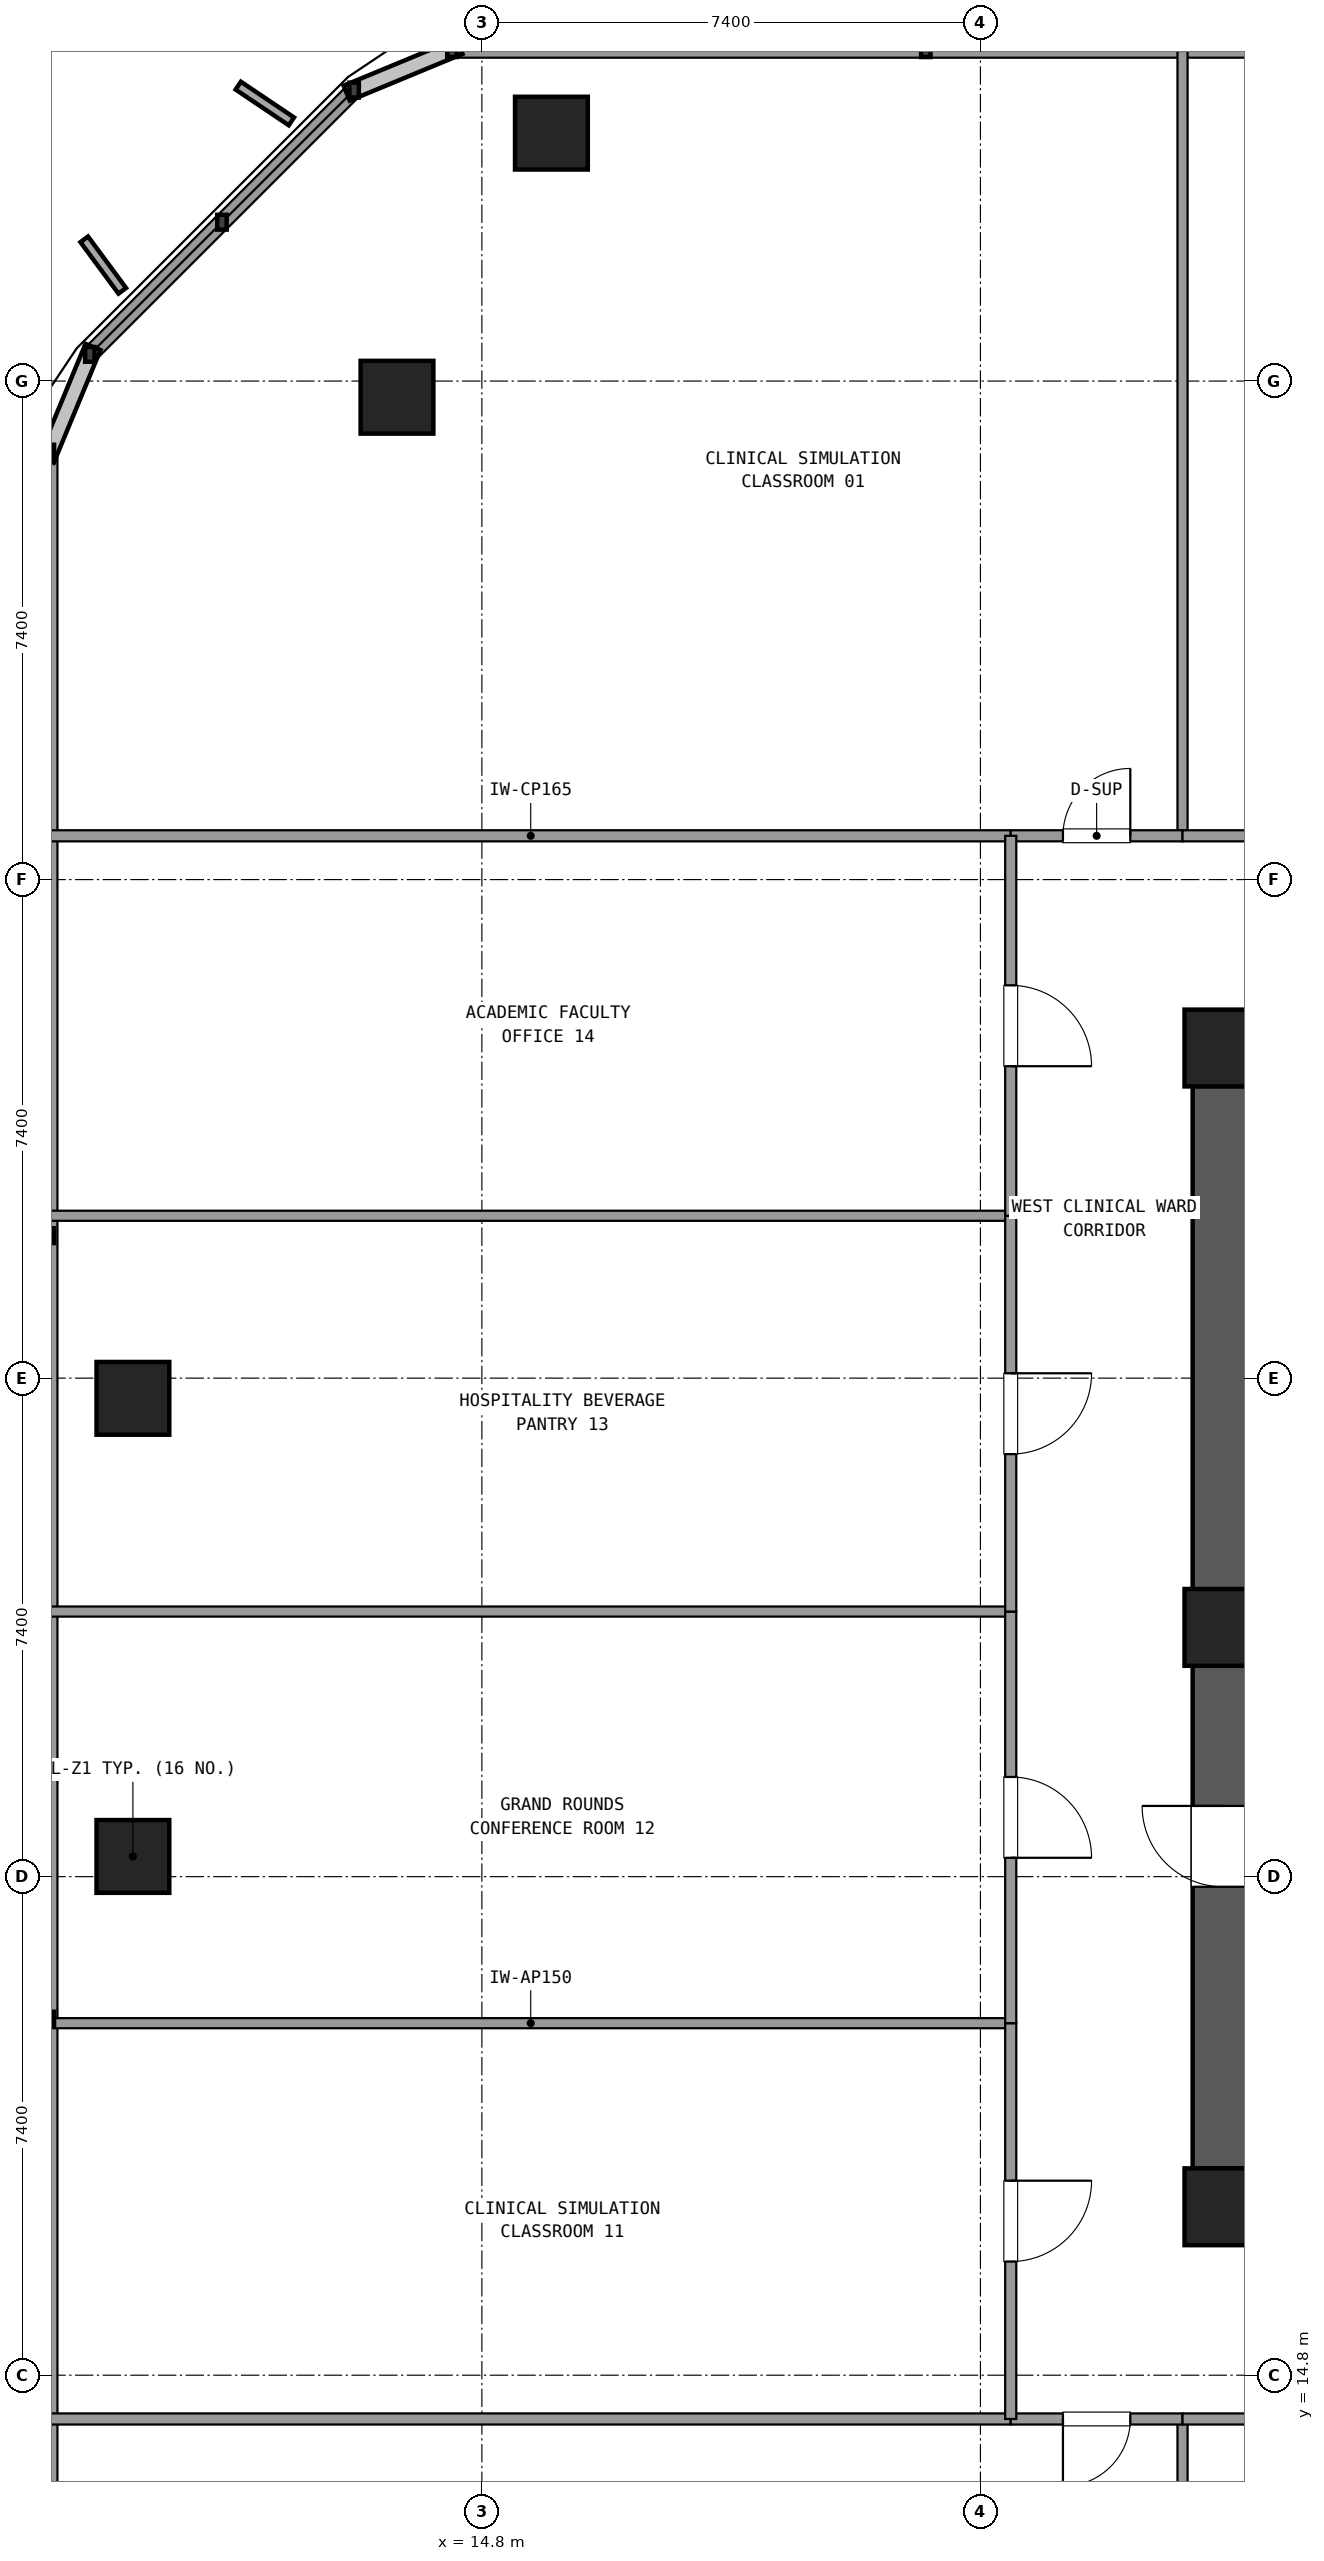
"""IFC4 building model, lengths in metres.
Left out: names, types, materials, properties, quantities, classifications, styles, units other than length and angle.
Written with IfcOpenShell. Run it as: python <this file> out.ifc"""

import sys

from ifc_helpers import new_model, si_unit, direction, frame, frame_2d, origin, origin_2d, place, context, subcontext, project, spatial, rectangle, extrude, element, fill, save


model = new_model("IFC4")
c1 = context("Model", 3, precision=1e-05, world=origin(), true_north=direction((0.0, 1.0)))
c2 = subcontext(c1, "Body", "Model", "MODEL_VIEW")
j1 = project(units=[si_unit("LENGTHUNIT", "METRE"), si_unit("PLANEANGLEUNIT", "RADIAN")], contexts=[c1])
p1 = place(None, origin())
s1 = spatial("IfcSite", under=j1, at=p1, CompositionType="ELEMENT")
p2 = place(p1, origin())
s2 = spatial("IfcBuilding", under=s1, at=p2, CompositionType="ELEMENT")
p3 = place(p2, frame((0.0, 0.0, 52.74)))
s3 = spatial("IfcBuildingStorey", under=s2, at=p3, CompositionType="ELEMENT", Elevation=52.74)
for number, where, z_axis, x_axis in (
    (1, (25.8, 17.3, 0.0), (0.0, 0.0, 1.0), (1.0, 0.0, 0.0)),
    (2, (25.8, 34.5, 0.0), (0.0, 0.0, 1.0), (1.0, 0.0, 0.0)),
    (3, (25.8, 25.9, 0.0), (0.0, 0.0, 1.0), (1.0, 0.0, 0.0)),
):
    element("IfcColumn", number, at=place(p3, frame(where, z_axis=z_axis, x_axis=x_axis)), inside=s3, PredefinedType="COLUMN", context=c2, shape_type="SweptSolid", body=[
        extrude(rectangle(XDim=1.14, YDim=1.14, at=origin_2d()), origin(), (0.0, 0.0, 1.0), 3.6),
    ])
p4 = place(p3, frame((25.8, 33.935, 0.0), z_axis=(0.0, 0.0, 1.0), x_axis=(0.0, -1.0, 0.0)))
e4 = element("IfcWall", 4, at=p4, inside=s3, PredefinedType="SHEAR", context=c2, shape_type="SweptSolid", body=[
    extrude(rectangle(XDim=7.47, YDim=0.9, at=frame_2d((3.735, 0.0))), origin(), (0.0, 0.0, 1.0), 3.32),
])
p5 = place(p3, frame((25.8, 25.335, 0.0), z_axis=(0.0, 0.0, 1.0), x_axis=(0.0, -1.0, 0.0)))
e5 = element("IfcWall", 5, at=p5, inside=s3, PredefinedType="SHEAR", context=c2, shape_type="SweptSolid", body=[
    extrude(rectangle(XDim=7.47, YDim=0.9, at=frame_2d((3.735, 0.0))), origin(), (0.0, 0.0, 1.0), 3.32),
])
p6 = place(p5, frame((2.085, 0.0, 0.0)))
e6 = element("IfcOpeningElement", 6, at=p6, cuts=e5, PredefinedType="OPENING", context=c2, shape_type="SweptSolid", body=[
    extrude(rectangle(XDim=1.2, YDim=2.15, at=frame_2d((0.6, 1.075))), frame((0.0, 0.46, 0.0), z_axis=(0.0, -1.0, 0.0), x_axis=(1.0, 0.0, 0.0)), (0.0, 0.0, 1.0), 0.92),
])
for number, where, z_axis, x_axis in (
    (7, (9.62, 22.5, 0.0), (0.0, 0.0, 1.0), (1.0, 0.0, 0.0)),
    (8, (15.832, 48.08, 0.0), (0.0, 0.0, 1.0), (1.0, 0.0, 0.0)),
    (9, (13.54, 44.16, 0.0), (0.0, 0.0, 1.0), (1.0, 0.0, 0.0)),
    (10, (9.62, 29.3, 0.0), (0.0, 0.0, 1.0), (1.0, 0.0, 0.0)),
):
    element("IfcColumn", number, at=place(p3, frame(where, z_axis=z_axis, x_axis=x_axis)), inside=s3, PredefinedType="COLUMN", context=c2, shape_type="SweptSolid", body=[
        extrude(rectangle(XDim=1.08, YDim=1.08, at=origin_2d()), origin(), (0.0, 0.0, 1.0), 3.6),
    ])
p7 = place(p3, frame((35.46, 49.32, 0.0), z_axis=(0.0, 0.0, 1.0), x_axis=(-1.0, 0.0, 0.0)))
e11 = element("IfcWall", 11, at=p7, inside=s3, PredefinedType="SOLIDWALL", context=c2, shape_type="SweptSolid", body=[
    extrude(rectangle(XDim=21.105, YDim=0.24, at=frame_2d((10.552, 0.0))), origin(), (0.0, 0.0, 1.0), 0.85),
])
p8 = place(p3, frame((12.904, 48.719, 0.0), z_axis=(0.0, 0.0, 1.0), x_axis=(-0.707106781187, -0.707106781187, 0.0)))
e12 = element("IfcWall", 12, at=p8, inside=s3, PredefinedType="SOLIDWALL", context=c2, shape_type="SweptSolid", body=[
    extrude(rectangle(XDim=5.548, YDim=0.24, at=frame_2d((2.774, 0.0))), origin(), (0.0, 0.0, 1.0), 0.85),
])
p9 = place(p3, frame((8.38, 43.345, 0.0), z_axis=(0.0, 0.0, 1.0), x_axis=(0.0, -1.0, 0.0)))
e13 = element("IfcWall", 13, at=p9, inside=s3, PredefinedType="SOLIDWALL", context=c2, shape_type="SweptSolid", body=[
    extrude(rectangle(XDim=34.89, YDim=0.24, at=frame_2d((17.445, 0.0))), origin(), (0.0, 0.0, 1.0), 0.85),
])
for number, where, z_axis, x_axis in (
    (14, (8.4, 37.65, 0.0), (0.0, 0.0, 1.0), (1.0, 0.0, 0.0)),
    (15, (8.4, 14.15, 0.0), (0.0, 0.0, 1.0), (1.0, 0.0, 0.0)),
):
    element("IfcWall", number, at=place(p3, frame(where, z_axis=z_axis, x_axis=x_axis)), inside=s3, PredefinedType="PARTITIONING", context=c2, shape_type="SweptSolid", body=[
        extrude(rectangle(XDim=14.25, YDim=0.165, at=frame_2d((7.125, 0.0))), origin(), (0.0, 0.0, 1.0), 2.61),
    ])
p10 = place(p3, frame((25.2, 37.65, 0.0), z_axis=(0.0, 0.0, 1.0), x_axis=(0.0, 1.0, 0.0)))
e16 = element("IfcWall", 16, at=p10, inside=s3, PredefinedType="PARTITIONING", context=c2, shape_type="SweptSolid", body=[
    extrude(rectangle(XDim=11.65, YDim=0.15, at=frame_2d((5.825, 0.0))), origin(), (0.0, 0.0, 1.0), 2.61),
])
p11 = place(p3, frame((22.65, 37.65, 0.0), z_axis=(0.0, 0.0, 1.0), x_axis=(1.0, 0.0, 0.0)))
e17 = element("IfcWall", 17, at=p11, inside=s3, PredefinedType="PARTITIONING", context=c2, shape_type="SweptSolid", body=[
    extrude(rectangle(XDim=2.55, YDim=0.165, at=frame_2d((1.275, 0.0))), origin(), (0.0, 0.0, 1.0), 2.61),
])
p12 = place(p11, frame((0.775, 0.0, 0.0)))
e18 = element("IfcOpeningElement", 18, at=p12, cuts=e17, PredefinedType="OPENING", context=c2, shape_type="SweptSolid", body=[
    extrude(rectangle(XDim=1.0, YDim=2.15, at=frame_2d((0.5, 1.075))), frame((0.0, 0.093, 0.0), z_axis=(0.0, -1.0, 0.0), x_axis=(1.0, 0.0, 0.0)), (0.0, 0.0, 1.0), 0.185),
])
p13 = place(p3, frame((25.2, 37.65, 0.0), z_axis=(0.0, 0.0, 1.0), x_axis=(1.0, 0.0, 0.0)))
e19 = element("IfcWall", 19, at=p13, inside=s3, PredefinedType="PARTITIONING", context=c2, shape_type="SweptSolid", body=[
    extrude(rectangle(XDim=5.181, YDim=0.165, at=frame_2d((2.591, 0.0))), origin(), (0.0, 0.0, 1.0), 2.61),
])
p14 = place(p13, frame((1.991, 0.0, 0.0)))
e20 = element("IfcOpeningElement", 20, at=p14, cuts=e19, PredefinedType="OPENING", context=c2, shape_type="SweptSolid", body=[
    extrude(rectangle(XDim=1.2, YDim=2.15, at=frame_2d((0.6, 1.075))), frame((0.0, 0.093, 0.0), z_axis=(0.0, -1.0, 0.0), x_axis=(1.0, 0.0, 0.0)), (0.0, 0.0, 1.0), 0.185),
])
p15 = place(p3, frame((25.2, 14.15, 0.0), z_axis=(0.0, 0.0, 1.0), x_axis=(0.0, -1.0, 0.0)))
e21 = element("IfcWall", 21, at=p15, inside=s3, PredefinedType="PARTITIONING", context=c2, shape_type="SweptSolid", body=[
    extrude(rectangle(XDim=11.65, YDim=0.15, at=frame_2d((5.825, 0.0))), origin(), (0.0, 0.0, 1.0), 2.61),
])
p16 = place(p3, frame((22.65, 14.15, 0.0), z_axis=(0.0, 0.0, 1.0), x_axis=(1.0, 0.0, 0.0)))
e22 = element("IfcWall", 22, at=p16, inside=s3, PredefinedType="PARTITIONING", context=c2, shape_type="SweptSolid", body=[
    extrude(rectangle(XDim=2.55, YDim=0.165, at=frame_2d((1.275, 0.0))), origin(), (0.0, 0.0, 1.0), 2.61),
])
p17 = place(p16, frame((0.775, 0.0, 0.0)))
e23 = element("IfcOpeningElement", 23, at=p17, cuts=e22, PredefinedType="OPENING", context=c2, shape_type="SweptSolid", body=[
    extrude(rectangle(XDim=1.0, YDim=2.15, at=frame_2d((0.5, 1.075))), frame((0.0, 0.093, 0.0), z_axis=(0.0, -1.0, 0.0), x_axis=(1.0, 0.0, 0.0)), (0.0, 0.0, 1.0), 0.185),
])
p18 = place(p3, frame((25.2, 14.15, 0.0), z_axis=(0.0, 0.0, 1.0), x_axis=(1.0, 0.0, 0.0)))
e24 = element("IfcWall", 24, at=p18, inside=s3, PredefinedType="PARTITIONING", context=c2, shape_type="SweptSolid", body=[
    extrude(rectangle(XDim=4.078, YDim=0.165, at=frame_2d((2.039, 0.0))), origin(), (0.0, 0.0, 1.0), 2.61),
])
p19 = place(p18, frame((1.439, 0.0, 0.0)))
e25 = element("IfcOpeningElement", 25, at=p19, cuts=e24, PredefinedType="OPENING", context=c2, shape_type="SweptSolid", body=[
    extrude(rectangle(XDim=1.2, YDim=2.15, at=frame_2d((0.6, 1.075))), frame((0.0, 0.093, 0.0), z_axis=(0.0, -1.0, 0.0), x_axis=(1.0, 0.0, 0.0)), (0.0, 0.0, 1.0), 0.185),
])
p20 = place(p3, frame((22.65, 20.025, 0.0), z_axis=(0.0, 0.0, 1.0), x_axis=(-1.0, 0.0, 0.0)))
e26 = element("IfcWall", 26, at=p20, inside=s3, PredefinedType="PARTITIONING", context=c2, shape_type="SweptSolid", body=[
    extrude(rectangle(XDim=14.25, YDim=0.15, at=frame_2d((7.125, 0.0))), origin(), (0.0, 0.0, 1.0), 2.61),
])
p21 = place(p3, frame((22.65, 14.15, 0.0), z_axis=(0.0, 0.0, 1.0), x_axis=(0.0, 1.0, 0.0)))
e27 = element("IfcWall", 27, at=p21, inside=s3, PredefinedType="PARTITIONING", context=c2, shape_type="SweptSolid", body=[
    extrude(rectangle(XDim=5.875, YDim=0.165, at=frame_2d((2.938, 0.0))), origin(), (0.0, 0.0, 1.0), 2.61),
])
p22 = place(p21, frame((2.337, 0.0, 0.0)))
e28 = element("IfcOpeningElement", 28, at=p22, cuts=e27, PredefinedType="OPENING", context=c2, shape_type="SweptSolid", body=[
    extrude(rectangle(XDim=1.2, YDim=2.15, at=frame_2d((0.6, 1.075))), frame((0.0, 0.093, 0.0), z_axis=(0.0, -1.0, 0.0), x_axis=(1.0, 0.0, 0.0)), (0.0, 0.0, 1.0), 0.185),
])
p23 = place(p3, frame((22.65, 26.135, 0.0), z_axis=(0.0, 0.0, 1.0), x_axis=(-1.0, 0.0, 0.0)))
e29 = element("IfcWall", 29, at=p23, inside=s3, PredefinedType="PARTITIONING", context=c2, shape_type="SweptSolid", body=[
    extrude(rectangle(XDim=14.25, YDim=0.15, at=frame_2d((7.125, 0.0))), origin(), (0.0, 0.0, 1.0), 2.61),
])
p24 = place(p3, frame((22.65, 20.025, 0.0), z_axis=(0.0, 0.0, 1.0), x_axis=(0.0, 1.0, 0.0)))
e30 = element("IfcWall", 30, at=p24, inside=s3, PredefinedType="PARTITIONING", context=c2, shape_type="SweptSolid", body=[
    extrude(rectangle(XDim=6.11, YDim=0.165, at=frame_2d((3.055, 0.0))), origin(), (0.0, 0.0, 1.0), 2.61),
])
p25 = place(p24, frame((2.455, 0.0, 0.0)))
e31 = element("IfcOpeningElement", 31, at=p25, cuts=e30, PredefinedType="OPENING", context=c2, shape_type="SweptSolid", body=[
    extrude(rectangle(XDim=1.2, YDim=2.15, at=frame_2d((0.6, 1.075))), frame((0.0, 0.093, 0.0), z_axis=(0.0, -1.0, 0.0), x_axis=(1.0, 0.0, 0.0)), (0.0, 0.0, 1.0), 0.185),
])
p26 = place(p3, frame((22.65, 32.01, 0.0), z_axis=(0.0, 0.0, 1.0), x_axis=(-1.0, 0.0, 0.0)))
e32 = element("IfcWall", 32, at=p26, inside=s3, PredefinedType="PARTITIONING", context=c2, shape_type="SweptSolid", body=[
    extrude(rectangle(XDim=14.25, YDim=0.15, at=frame_2d((7.125, 0.0))), origin(), (0.0, 0.0, 1.0), 2.61),
])
p27 = place(p3, frame((22.65, 26.135, 0.0), z_axis=(0.0, 0.0, 1.0), x_axis=(0.0, 1.0, 0.0)))
e33 = element("IfcWall", 33, at=p27, inside=s3, PredefinedType="PARTITIONING", context=c2, shape_type="SweptSolid", body=[
    extrude(rectangle(XDim=5.875, YDim=0.165, at=frame_2d((2.938, 0.0))), origin(), (0.0, 0.0, 1.0), 2.61),
])
p28 = place(p27, frame((2.337, 0.0, 0.0)))
e34 = element("IfcOpeningElement", 34, at=p28, cuts=e33, PredefinedType="OPENING", context=c2, shape_type="SweptSolid", body=[
    extrude(rectangle(XDim=1.2, YDim=2.15, at=frame_2d((0.6, 1.075))), frame((0.0, 0.093, 0.0), z_axis=(0.0, -1.0, 0.0), x_axis=(1.0, 0.0, 0.0)), (0.0, 0.0, 1.0), 0.185),
])
p29 = place(p3, frame((22.65, 32.01, 0.0), z_axis=(0.0, 0.0, 1.0), x_axis=(0.0, 1.0, 0.0)))
e35 = element("IfcWall", 35, at=p29, inside=s3, PredefinedType="PARTITIONING", context=c2, shape_type="SweptSolid", body=[
    extrude(rectangle(XDim=5.64, YDim=0.165, at=frame_2d((2.82, 0.0))), origin(), (0.0, 0.0, 1.0), 2.61),
])
p30 = place(p29, frame((2.22, 0.0, 0.0)))
e36 = element("IfcOpeningElement", 36, at=p30, cuts=e35, PredefinedType="OPENING", context=c2, shape_type="SweptSolid", body=[
    extrude(rectangle(XDim=1.2, YDim=2.15, at=frame_2d((0.6, 1.075))), frame((0.0, 0.093, 0.0), z_axis=(0.0, -1.0, 0.0), x_axis=(1.0, 0.0, 0.0)), (0.0, 0.0, 1.0), 0.185),
])
p31 = place(p6, frame((1.2, 0.0, 0.0), z_axis=(0.0, 0.0, 1.0), x_axis=(-1.0, 0.0, 0.0)))
e37 = element("IfcDoor", 37, at=p31, inside=s3, OperationType="SINGLE_SWING_LEFT", PredefinedType="DOOR", context=c2, shape_type="SweptSolid", body=[
    extrude(rectangle(XDim=1.2, YDim=2.15, at=frame_2d((0.6, 1.075))), frame((0.0, 0.025, 0.0), z_axis=(0.0, -1.0, 0.0), x_axis=(1.0, 0.0, 0.0)), (0.0, 0.0, 1.0), 0.05),
])
fill(e6, e37)
p32 = place(p12, origin())
e38 = element("IfcDoor", 38, at=p32, inside=s3, OperationType="SINGLE_SWING_RIGHT", PredefinedType="DOOR", context=c2, shape_type="SweptSolid", body=[
    extrude(rectangle(XDim=1.0, YDim=2.15, at=frame_2d((0.5, 1.075))), frame((0.0, 0.025, 0.0), z_axis=(0.0, -1.0, 0.0), x_axis=(1.0, 0.0, 0.0)), (0.0, 0.0, 1.0), 0.05),
])
fill(e18, e38)
p33 = place(p17, frame((1.0, 0.0, 0.0), z_axis=(0.0, 0.0, 1.0), x_axis=(-1.0, 0.0, 0.0)))
e39 = element("IfcDoor", 39, at=p33, inside=s3, OperationType="SINGLE_SWING_LEFT", PredefinedType="DOOR", context=c2, shape_type="SweptSolid", body=[
    extrude(rectangle(XDim=1.0, YDim=2.15, at=frame_2d((0.5, 1.075))), frame((0.0, 0.025, 0.0), z_axis=(0.0, -1.0, 0.0), x_axis=(1.0, 0.0, 0.0)), (0.0, 0.0, 1.0), 0.05),
])
fill(e23, e39)
p34 = place(p22, frame((1.2, 0.0, 0.0), z_axis=(0.0, 0.0, 1.0), x_axis=(-1.0, 0.0, 0.0)))
e40 = element("IfcDoor", 40, at=p34, inside=s3, OperationType="SINGLE_SWING_RIGHT", PredefinedType="DOOR", context=c2, shape_type="SweptSolid", body=[
    extrude(rectangle(XDim=1.2, YDim=2.15, at=frame_2d((0.6, 1.075))), frame((0.0, 0.025, 0.0), z_axis=(0.0, -1.0, 0.0), x_axis=(1.0, 0.0, 0.0)), (0.0, 0.0, 1.0), 0.05),
])
fill(e28, e40)
p35 = place(p25, frame((1.2, 0.0, 0.0), z_axis=(0.0, 0.0, 1.0), x_axis=(-1.0, 0.0, 0.0)))
e41 = element("IfcDoor", 41, at=p35, inside=s3, OperationType="SINGLE_SWING_LEFT", PredefinedType="DOOR", context=c2, shape_type="SweptSolid", body=[
    extrude(rectangle(XDim=1.2, YDim=2.15, at=frame_2d((0.6, 1.075))), frame((0.0, 0.025, 0.0), z_axis=(0.0, -1.0, 0.0), x_axis=(1.0, 0.0, 0.0)), (0.0, 0.0, 1.0), 0.05),
])
fill(e31, e41)
p36 = place(p28, frame((1.2, 0.0, 0.0), z_axis=(0.0, 0.0, 1.0), x_axis=(-1.0, 0.0, 0.0)))
e42 = element("IfcDoor", 42, at=p36, inside=s3, OperationType="SINGLE_SWING_RIGHT", PredefinedType="DOOR", context=c2, shape_type="SweptSolid", body=[
    extrude(rectangle(XDim=1.2, YDim=2.15, at=frame_2d((0.6, 1.075))), frame((0.0, 0.025, 0.0), z_axis=(0.0, -1.0, 0.0), x_axis=(1.0, 0.0, 0.0)), (0.0, 0.0, 1.0), 0.05),
])
fill(e34, e42)
p37 = place(p30, frame((1.2, 0.0, 0.0), z_axis=(0.0, 0.0, 1.0), x_axis=(-1.0, 0.0, 0.0)))
e43 = element("IfcDoor", 43, at=p37, inside=s3, OperationType="SINGLE_SWING_LEFT", PredefinedType="DOOR", context=c2, shape_type="SweptSolid", body=[
    extrude(rectangle(XDim=1.2, YDim=2.15, at=frame_2d((0.6, 1.075))), frame((0.0, 0.025, 0.0), z_axis=(0.0, -1.0, 0.0), x_axis=(1.0, 0.0, 0.0)), (0.0, 0.0, 1.0), 0.05),
])
fill(e36, e43)
save(model, sys.argv[1])
